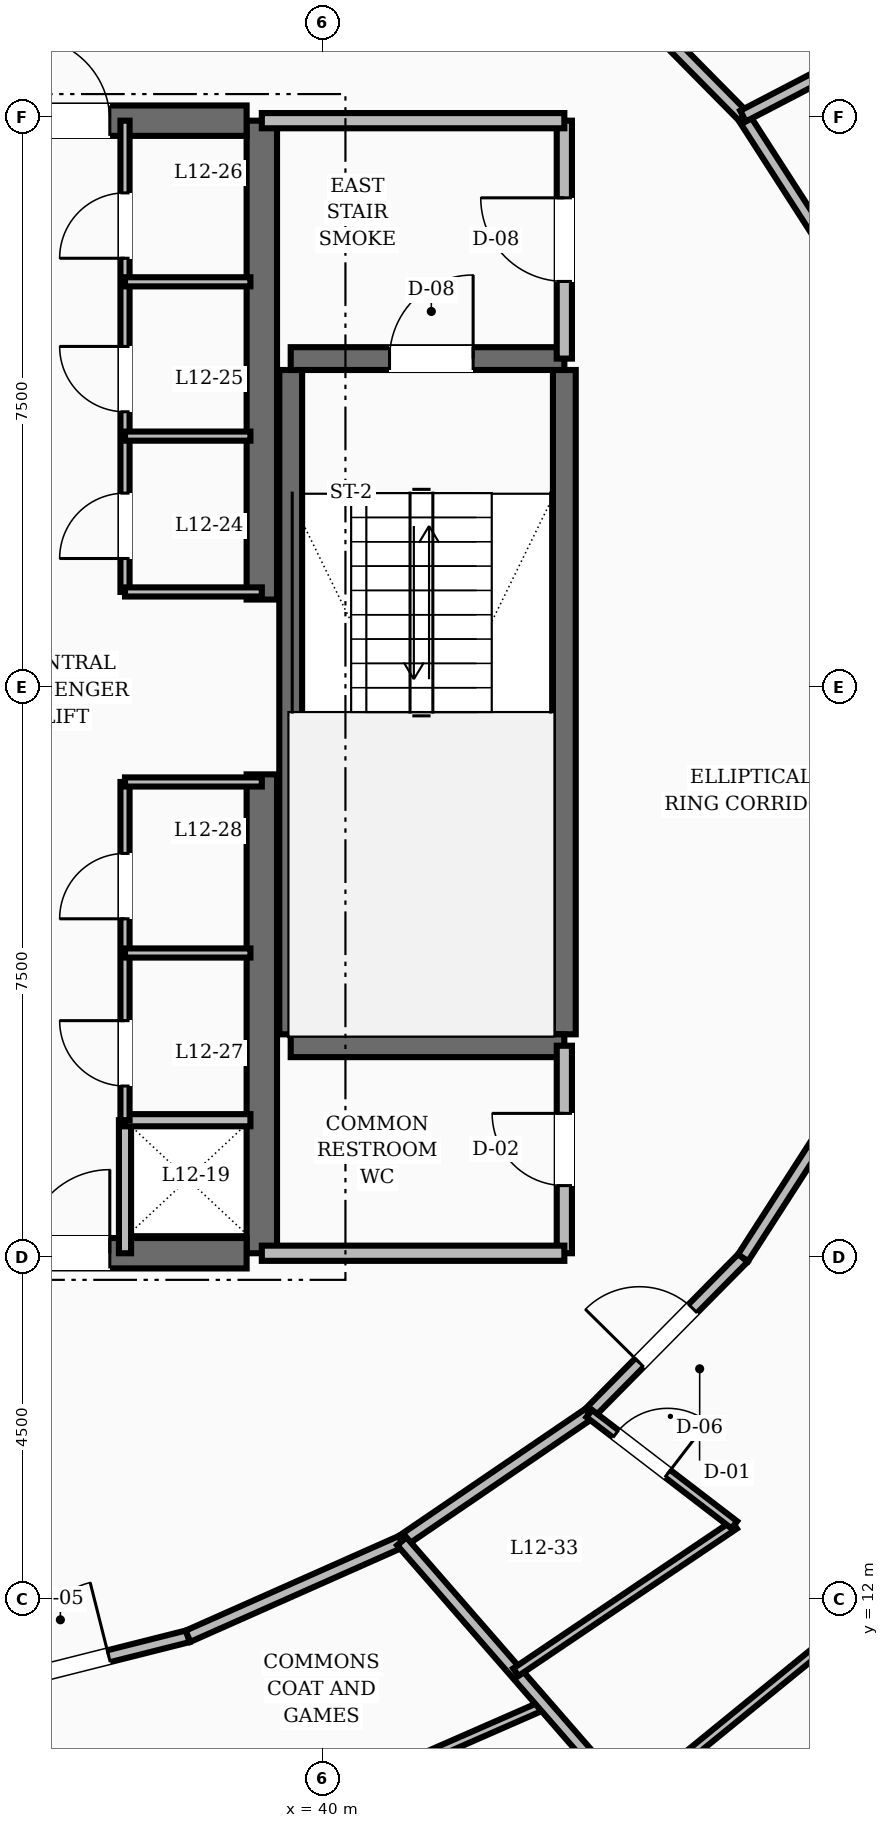
"""IFC4 building model, lengths in metres.
Left out: names, types, materials, properties, quantities, classifications, styles, units other than length and angle.
Written with IfcOpenShell. Run it as: python <this file> out.ifc"""

import sys

from ifc_helpers import new_model, si_unit, direction, frame, frame_2d, origin, place, context, subcontext, project, spatial, rectangle, extrude, element, fill, save


model = new_model("IFC4")
c1 = context("Model", 3, precision=1e-05, world=origin(), true_north=direction((0.0, 1.0)))
c2 = subcontext(c1, "Body", "Model", "MODEL_VIEW")
j1 = project(units=[si_unit("LENGTHUNIT", "METRE"), si_unit("PLANEANGLEUNIT", "RADIAN")], contexts=[c1])
p1 = place(None, origin())
s1 = spatial("IfcSite", under=j1, at=p1, CompositionType="ELEMENT")
p2 = place(p1, origin())
s2 = spatial("IfcBuilding", under=s1, at=p2, CompositionType="ELEMENT")
p3 = place(p2, frame((0.0, 0.0, 52.0)))
s3 = spatial("IfcBuildingStorey", under=s2, at=p3, CompositionType="ELEMENT", Elevation=52.0)
for number, where, z_axis, x_axis in (
    (1, (39.2, 16.55, 0.0), (0.0, 0.0, 1.0), (0.0, 1.0, 0.0)),
    (2, (39.2, 25.15, 0.0), (0.0, 0.0, 1.0), (0.0, 1.0, 0.0)),
):
    element("IfcWall", number, at=place(p3, frame(where, z_axis=z_axis, x_axis=x_axis)), inside=s3, PredefinedType="SHEAR", context=c2, shape_type="SweptSolid", body=[
        extrude(rectangle(XDim=6.3, YDim=0.4, at=frame_2d((3.15, 0.0))), origin(), (0.0, 0.0, 1.0), 3.6),
    ])
p4 = place(p3, frame((35.8, 16.55, 0.0), z_axis=(0.0, 0.0, 1.0), x_axis=(1.0, 0.0, 0.0)))
e3 = element("IfcWall", 3, at=p4, inside=s3, PredefinedType="SHEAR", context=c2, shape_type="SweptSolid", body=[
    extrude(rectangle(XDim=3.2, YDim=0.4, at=frame_2d((1.6, 0.0))), origin(), (0.0, 0.0, 1.0), 3.6),
])
p5 = place(p4, frame((0.3, 0.0, 0.0)))
e4 = element("IfcOpeningElement", 4, at=p5, cuts=e3, PredefinedType="OPENING", context=c2, shape_type="SweptSolid", body=[
    extrude(rectangle(XDim=1.1, YDim=2.1, at=frame_2d((0.55, 1.05))), frame((0.0, 0.21, 0.0), z_axis=(0.0, -1.0, 0.0), x_axis=(1.0, 0.0, 0.0)), (0.0, 0.0, 1.0), 0.42),
])
p6 = place(p3, frame((35.8, 31.45, 0.0), z_axis=(0.0, 0.0, 1.0), x_axis=(1.0, 0.0, 0.0)))
e5 = element("IfcWall", 5, at=p6, inside=s3, PredefinedType="SHEAR", context=c2, shape_type="SweptSolid", body=[
    extrude(rectangle(XDim=3.2, YDim=0.4, at=frame_2d((1.6, 0.0))), origin(), (0.0, 0.0, 1.0), 3.6),
])
p7 = place(p6, frame((0.3, 0.0, 0.0)))
e6 = element("IfcOpeningElement", 6, at=p7, cuts=e5, PredefinedType="OPENING", context=c2, shape_type="SweptSolid", body=[
    extrude(rectangle(XDim=1.1, YDim=2.1, at=frame_2d((0.55, 1.05))), frame((0.0, 0.21, 0.0), z_axis=(0.0, -1.0, 0.0), x_axis=(1.0, 0.0, 0.0)), (0.0, 0.0, 1.0), 0.42),
])
for number, where, z_axis, x_axis in (
    (7, (43.18, 19.43, 0.0), (0.0, 0.0, 1.0), (0.0, 1.0, 0.0)),
    (8, (39.58, 19.43, 0.0), (0.0, 0.0, 1.0), (0.0, 1.0, 0.0)),
):
    element("IfcWall", number, at=place(p3, frame(where, z_axis=z_axis, x_axis=x_axis)), inside=s3, PredefinedType="SHEAR", context=c2, shape_type="SweptSolid", body=[
        extrude(rectangle(XDim=8.74, YDim=0.3, at=frame_2d((4.37, 0.0))), origin(), (0.0, 0.0, 1.0), 3.6),
    ])
p8 = place(p3, frame((39.58, 19.28, 0.0), z_axis=(0.0, 0.0, 1.0), x_axis=(1.0, 0.0, 0.0)))
e9 = element("IfcWall", 9, at=p8, inside=s3, PredefinedType="SHEAR", context=c2, shape_type="SweptSolid", body=[
    extrude(rectangle(XDim=3.6, YDim=0.3, at=frame_2d((1.8, 0.0))), origin(), (0.0, 0.0, 1.0), 3.6),
])
p9 = place(p3, frame((39.58, 28.32, 0.0), z_axis=(0.0, 0.0, 1.0), x_axis=(1.0, 0.0, 0.0)))
e10 = element("IfcWall", 10, at=p9, inside=s3, PredefinedType="SHEAR", context=c2, shape_type="SweptSolid", body=[
    extrude(rectangle(XDim=3.6, YDim=0.3, at=frame_2d((1.8, 0.0))), origin(), (0.0, 0.0, 1.0), 3.6),
])
p10 = place(p9, frame((1.3, 0.0, 0.0)))
e11 = element("IfcOpeningElement", 11, at=p10, cuts=e10, PredefinedType="OPENING", context=c2, shape_type="SweptSolid", body=[
    extrude(rectangle(XDim=1.1, YDim=2.1, at=frame_2d((0.55, 1.05))), frame((0.0, 0.16, 0.0), z_axis=(0.0, -1.0, 0.0), x_axis=(1.0, 0.0, 0.0)), (0.0, 0.0, 1.0), 0.32),
])
p11 = place(p3, frame((43.18, 28.32, 0.0), z_axis=(0.0, 0.0, 1.0), x_axis=(0.0, 1.0, 0.0)))
e12 = element("IfcWall", 12, at=p11, inside=s3, PredefinedType="SOLIDWALL", context=c2, shape_type="SweptSolid", body=[
    extrude(rectangle(XDim=3.13, YDim=0.2, at=frame_2d((1.565, 0.0))), origin(), (0.0, 0.0, 1.0), 2.61),
])
p12 = place(p11, frame((1.015, 0.0, 0.0)))
e13 = element("IfcOpeningElement", 13, at=p12, cuts=e12, PredefinedType="OPENING", context=c2, shape_type="SweptSolid", body=[
    extrude(rectangle(XDim=1.1, YDim=2.1, at=frame_2d((0.55, 1.05))), frame((0.0, 0.11, 0.0), z_axis=(0.0, -1.0, 0.0), x_axis=(1.0, 0.0, 0.0)), (0.0, 0.0, 1.0), 0.22),
])
p13 = place(p3, frame((39.2, 31.45, 0.0), z_axis=(0.0, 0.0, 1.0), x_axis=(1.0, 0.0, 0.0)))
e14 = element("IfcWall", 14, at=p13, inside=s3, PredefinedType="SOLIDWALL", context=c2, shape_type="SweptSolid", body=[
    extrude(rectangle(XDim=3.98, YDim=0.2, at=frame_2d((1.99, 0.0))), origin(), (0.0, 0.0, 1.0), 2.61),
])
p14 = place(p3, frame((43.18, 16.55, 0.0), z_axis=(0.0, 0.0, 1.0), x_axis=(0.0, 1.0, 0.0)))
e15 = element("IfcWall", 15, at=p14, inside=s3, PredefinedType="SOLIDWALL", context=c2, shape_type="SweptSolid", body=[
    extrude(rectangle(XDim=2.73, YDim=0.2, at=frame_2d((1.365, 0.0))), origin(), (0.0, 0.0, 1.0), 2.61),
])
p15 = place(p14, frame((0.89, 0.0, 0.0)))
e16 = element("IfcOpeningElement", 16, at=p15, cuts=e15, PredefinedType="OPENING", context=c2, shape_type="SweptSolid", body=[
    extrude(rectangle(XDim=0.95, YDim=2.1, at=frame_2d((0.475, 1.05))), frame((0.0, 0.11, 0.0), z_axis=(0.0, -1.0, 0.0), x_axis=(1.0, 0.0, 0.0)), (0.0, 0.0, 1.0), 0.22),
])
p16 = place(p3, frame((39.2, 16.55, 0.0), z_axis=(0.0, 0.0, 1.0), x_axis=(1.0, 0.0, 0.0)))
e17 = element("IfcWall", 17, at=p16, inside=s3, PredefinedType="SOLIDWALL", context=c2, shape_type="SweptSolid", body=[
    extrude(rectangle(XDim=3.98, YDim=0.2, at=frame_2d((1.99, 0.0))), origin(), (0.0, 0.0, 1.0), 2.61),
])
p17 = place(p3, frame((37.4, 16.55, 0.0), z_axis=(0.0, 0.0, 1.0), x_axis=(0.0, 1.0, 0.0)))
e18 = element("IfcWall", 18, at=p17, inside=s3, PredefinedType="SOLIDWALL", context=c2, shape_type="SweptSolid", body=[
    extrude(rectangle(XDim=1.75, YDim=0.16, at=frame_2d((0.875, 0.0))), origin(), (0.0, 0.0, 1.0), 2.61),
])
p18 = place(p3, frame((37.4, 18.3, 0.0), z_axis=(0.0, 0.0, 1.0), x_axis=(1.0, 0.0, 0.0)))
e19 = element("IfcWall", 19, at=p18, inside=s3, PredefinedType="SOLIDWALL", context=c2, shape_type="SweptSolid", body=[
    extrude(rectangle(XDim=1.65, YDim=0.16, at=frame_2d((0.825, 0.0))), origin(), (0.0, 0.0, 1.0), 2.61),
])
p19 = place(p3, frame((37.4, 25.25, 0.0), z_axis=(0.0, 0.0, 1.0), x_axis=(0.0, 1.0, 0.0)))
e20 = element("IfcWall", 20, at=p19, inside=s3, PredefinedType="PARTITIONING", context=c2, shape_type="SweptSolid", body=[
    extrude(rectangle(XDim=6.2, YDim=0.12, at=frame_2d((3.1, 0.0))), origin(), (0.0, 0.0, 1.0), 2.61),
])
p20 = place(p19, frame((0.44, 0.0, 0.0)))
e21 = element("IfcOpeningElement", 21, at=p20, cuts=e20, PredefinedType="OPENING", context=c2, shape_type="SweptSolid", body=[
    extrude(rectangle(XDim=0.86, YDim=2.1, at=frame_2d((0.43, 1.05))), frame((0.0, 0.07, 0.0), z_axis=(0.0, -1.0, 0.0), x_axis=(1.0, 0.0, 0.0)), (0.0, 0.0, 1.0), 0.14),
])
p21 = place(p19, frame((2.37, 0.0, 0.0)))
e22 = element("IfcOpeningElement", 22, at=p21, cuts=e20, PredefinedType="OPENING", context=c2, shape_type="SweptSolid", body=[
    extrude(rectangle(XDim=0.86, YDim=2.1, at=frame_2d((0.43, 1.05))), frame((0.0, 0.07, 0.0), z_axis=(0.0, -1.0, 0.0), x_axis=(1.0, 0.0, 0.0)), (0.0, 0.0, 1.0), 0.14),
])
p22 = place(p19, frame((4.39, 0.0, 0.0)))
e23 = element("IfcOpeningElement", 23, at=p22, cuts=e20, PredefinedType="OPENING", context=c2, shape_type="SweptSolid", body=[
    extrude(rectangle(XDim=0.86, YDim=2.1, at=frame_2d((0.43, 1.05))), frame((0.0, 0.07, 0.0), z_axis=(0.0, -1.0, 0.0), x_axis=(1.0, 0.0, 0.0)), (0.0, 0.0, 1.0), 0.14),
])
p23 = place(p3, frame((37.4, 25.25, 0.0), z_axis=(0.0, 0.0, 1.0), x_axis=(1.0, 0.0, 0.0)))
e24 = element("IfcWall", 24, at=p23, inside=s3, PredefinedType="PARTITIONING", context=c2, shape_type="SweptSolid", body=[
    extrude(rectangle(XDim=1.8, YDim=0.12, at=frame_2d((0.9, 0.0))), origin(), (0.0, 0.0, 1.0), 2.61),
])
p24 = place(p3, frame((37.4, 18.3, 0.0), z_axis=(0.0, 0.0, 1.0), x_axis=(0.0, 1.0, 0.0)))
e25 = element("IfcWall", 25, at=p24, inside=s3, PredefinedType="PARTITIONING", context=c2, shape_type="SweptSolid", body=[
    extrude(rectangle(XDim=4.45, YDim=0.12, at=frame_2d((2.225, 0.0))), origin(), (0.0, 0.0, 1.0), 2.61),
])
p25 = place(p24, frame((0.45, 0.0, 0.0)))
e26 = element("IfcOpeningElement", 26, at=p25, cuts=e25, PredefinedType="OPENING", context=c2, shape_type="SweptSolid", body=[
    extrude(rectangle(XDim=0.86, YDim=2.1, at=frame_2d((0.43, 1.05))), frame((0.0, 0.07, 0.0), z_axis=(0.0, -1.0, 0.0), x_axis=(1.0, 0.0, 0.0)), (0.0, 0.0, 1.0), 0.14),
])
p26 = place(p24, frame((2.65, 0.0, 0.0)))
e27 = element("IfcOpeningElement", 27, at=p26, cuts=e25, PredefinedType="OPENING", context=c2, shape_type="SweptSolid", body=[
    extrude(rectangle(XDim=0.86, YDim=2.1, at=frame_2d((0.43, 1.05))), frame((0.0, 0.07, 0.0), z_axis=(0.0, -1.0, 0.0), x_axis=(1.0, 0.0, 0.0)), (0.0, 0.0, 1.0), 0.14),
])
p27 = place(p3, frame((37.4, 22.75, 0.0), z_axis=(0.0, 0.0, 1.0), x_axis=(1.0, 0.0, 0.0)))
e28 = element("IfcWall", 28, at=p27, inside=s3, PredefinedType="PARTITIONING", context=c2, shape_type="SweptSolid", body=[
    extrude(rectangle(XDim=1.8, YDim=0.12, at=frame_2d((0.9, 0.0))), origin(), (0.0, 0.0, 1.0), 2.61),
])
for number, where, z_axis, x_axis in (
    (29, (37.4, 27.3, 0.0), (0.0, 0.0, 1.0), (1.0, 0.0, 0.0)),
    (30, (37.4, 29.33, 0.0), (0.0, 0.0, 1.0), (1.0, 0.0, 0.0)),
    (31, (37.4, 20.5, 0.0), (0.0, 0.0, 1.0), (1.0, 0.0, 0.0)),
):
    element("IfcWall", number, at=place(p3, frame(where, z_axis=z_axis, x_axis=x_axis)), inside=s3, PredefinedType="PARTITIONING", context=c2, shape_type="SweptSolid", body=[
        extrude(rectangle(XDim=1.65, YDim=0.12, at=frame_2d((0.825, 0.0))), origin(), (0.0, 0.0, 1.0), 2.61),
    ])
p28 = place(p3, frame((47.035, 29.173, 0.0), z_axis=(0.0, 0.0, 1.0), x_axis=(-0.541126045017, 0.840941498206, 0.0)))
e32 = element("IfcWall", 32, at=p28, inside=s3, PredefinedType="SOLIDWALL", context=c2, shape_type="SweptSolid", body=[
    extrude(rectangle(XDim=2.779, YDim=0.16, at=frame_2d((1.39, 0.0))), origin(), (0.0, 0.0, 1.0), 2.61),
])
p29 = place(p3, frame((45.531, 31.51, 0.0), z_axis=(0.0, 0.0, 1.0), x_axis=(-0.702811997, 0.711375636969, 0.0)))
e33 = element("IfcWall", 33, at=p29, inside=s3, PredefinedType="SOLIDWALL", context=c2, shape_type="SweptSolid", body=[
    extrude(rectangle(XDim=2.879, YDim=0.16, at=frame_2d((1.44, 0.0))), origin(), (0.0, 0.0, 1.0), 2.61),
])
p30 = place(p3, frame((35.175, 10.742, 0.0), z_axis=(0.0, 0.0, 1.0), x_axis=(0.969689238064, 0.244341526521, 0.0)))
e34 = element("IfcWall", 34, at=p30, inside=s3, PredefinedType="SOLIDWALL", context=c2, shape_type="SweptSolid", body=[
    extrude(rectangle(XDim=3.148, YDim=0.16, at=frame_2d((1.574, 0.0))), origin(), (0.0, 0.0, 1.0), 2.61),
])
p31 = place(p30, frame((1.074, 0.0, 0.0)))
e35 = element("IfcOpeningElement", 35, at=p31, cuts=e34, PredefinedType="OPENING", context=c2, shape_type="SweptSolid", body=[
    extrude(rectangle(XDim=1.0, YDim=2.1, at=frame_2d((0.5, 1.05))), frame((0.0, 0.09, 0.0), z_axis=(0.0, -1.0, 0.0), x_axis=(1.0, 0.0, 0.0)), (0.0, 0.0, 1.0), 0.18),
])
p32 = place(p3, frame((38.228, 11.511, 0.0), z_axis=(0.0, 0.0, 1.0), x_axis=(0.913952123493, 0.405822024984, 0.0)))
e36 = element("IfcWall", 36, at=p32, inside=s3, PredefinedType="SOLIDWALL", context=c2, shape_type="SweptSolid", body=[
    extrude(rectangle(XDim=3.078, YDim=0.16, at=frame_2d((1.539, 0.0))), origin(), (0.0, 0.0, 1.0), 2.61),
])
p33 = place(p3, frame((41.041, 12.76, 0.0), z_axis=(0.0, 0.0, 1.0), x_axis=(0.826293096206, 0.56324037423, 0.0)))
e37 = element("IfcWall", 37, at=p33, inside=s3, PredefinedType="SOLIDWALL", context=c2, shape_type="SweptSolid", body=[
    extrude(rectangle(XDim=2.985, YDim=0.16, at=frame_2d((1.492, 0.0))), origin(), (0.0, 0.0, 1.0), 2.61),
])
p34 = place(p3, frame((43.508, 14.441, 0.0), z_axis=(0.0, 0.0, 1.0), x_axis=(0.702811997, 0.711375636969, 0.0)))
e38 = element("IfcWall", 38, at=p34, inside=s3, PredefinedType="SOLIDWALL", context=c2, shape_type="SweptSolid", body=[
    extrude(rectangle(XDim=2.879, YDim=0.16, at=frame_2d((1.44, 0.0))), origin(), (0.0, 0.0, 1.0), 2.61),
])
p35 = place(p34, frame((0.94, 0.0, 0.0)))
e39 = element("IfcOpeningElement", 39, at=p35, cuts=e38, PredefinedType="OPENING", context=c2, shape_type="SweptSolid", body=[
    extrude(rectangle(XDim=1.0, YDim=2.1, at=frame_2d((0.5, 1.05))), frame((0.0, 0.09, 0.0), z_axis=(0.0, -1.0, 0.0), x_axis=(1.0, 0.0, 0.0)), (0.0, 0.0, 1.0), 0.18),
])
p36 = place(p3, frame((45.531, 16.49, 0.0), z_axis=(0.0, 0.0, 1.0), x_axis=(0.541126045017, 0.840941498206, 0.0)))
e40 = element("IfcWall", 40, at=p36, inside=s3, PredefinedType="SOLIDWALL", context=c2, shape_type="SweptSolid", body=[
    extrude(rectangle(XDim=2.779, YDim=0.16, at=frame_2d((1.39, 0.0))), origin(), (0.0, 0.0, 1.0), 2.61),
])
p37 = place(p3, frame((39.519, 9.119, 0.0), z_axis=(0.0, 0.0, 1.0), x_axis=(0.91594871557, 0.401295340672, 0.0)))
e41 = element("IfcWall", 41, at=p37, inside=s3, PredefinedType="PARTITIONING", context=c2, shape_type="SweptSolid", body=[
    extrude(rectangle(XDim=3.709, YDim=0.12, at=frame_2d((1.854, 0.0))), origin(), (0.0, 0.0, 1.0), 2.61),
])
p38 = place(p3, frame((41.041, 12.76, 0.0), z_axis=(0.0, 0.0, 1.0), x_axis=(0.656743729698, -0.754113833252, 0.0)))
e42 = element("IfcWall", 42, at=p38, inside=s3, PredefinedType="SOLIDWALL", context=c2, shape_type="SweptSolid", body=[
    extrude(rectangle(XDim=8.106, YDim=0.16, at=frame_2d((4.053, 0.0))), origin(), (0.0, 0.0, 1.0), 2.61),
])
p39 = place(p3, frame((42.541, 11.038, 0.0), z_axis=(0.0, 0.0, 1.0), x_axis=(0.829125253788, 0.559062888709, 0.0)))
e43 = element("IfcWall", 43, at=p39, inside=s3, PredefinedType="PARTITIONING", context=c2, shape_type="SweptSolid", body=[
    extrude(rectangle(XDim=3.468, YDim=0.12, at=frame_2d((1.734, 0.0))), origin(), (0.0, 0.0, 1.0), 2.61),
])
p40 = place(p3, frame((43.508, 14.441, 0.0), z_axis=(0.0, 0.0, 1.0), x_axis=(0.793351497124, -0.608763831063, 0.0)))
e44 = element("IfcWall", 44, at=p40, inside=s3, PredefinedType="PARTITIONING", context=c2, shape_type="SweptSolid", body=[
    extrude(rectangle(XDim=2.406, YDim=0.12, at=frame_2d((1.203, 0.0))), origin(), (0.0, 0.0, 1.0), 2.61),
])
p41 = place(p40, frame((0.44, 0.0, 0.0)))
e45 = element("IfcOpeningElement", 45, at=p41, cuts=e44, PredefinedType="OPENING", context=c2, shape_type="SweptSolid", body=[
    extrude(rectangle(XDim=0.86, YDim=2.1, at=frame_2d((0.43, 1.05))), frame((0.0, 0.07, 0.0), z_axis=(0.0, -1.0, 0.0), x_axis=(1.0, 0.0, 0.0)), (0.0, 0.0, 1.0), 0.14),
])
p42 = place(p3, frame((44.041, 9.316, 0.0), z_axis=(0.0, 0.0, 1.0), x_axis=(0.775210874422, 0.631702540899, 0.0)))
e46 = element("IfcWall", 46, at=p42, inside=s3, PredefinedType="PARTITIONING", context=c2, shape_type="SweptSolid", body=[
    extrude(rectangle(XDim=7.713, YDim=0.12, at=frame_2d((3.857, 0.0))), origin(), (0.0, 0.0, 1.0), 2.61),
])
p43 = place(p42, frame((4.676, 0.0, 0.0)))
e47 = element("IfcOpeningElement", 47, at=p43, cuts=e46, PredefinedType="OPENING", context=c2, shape_type="SweptSolid", body=[
    extrude(rectangle(XDim=0.95, YDim=2.1, at=frame_2d((0.475, 1.05))), frame((0.0, 0.07, 0.0), z_axis=(0.0, -1.0, 0.0), x_axis=(1.0, 0.0, 0.0)), (0.0, 0.0, 1.0), 0.14),
])
p44 = place(p3, frame((45.531, 31.51, 0.0), z_axis=(0.0, 0.0, 1.0), x_axis=(0.886782865133, 0.462186272088, 0.0)))
e48 = element("IfcWall", 48, at=p44, inside=s3, PredefinedType="SOLIDWALL", context=c2, shape_type="SweptSolid", body=[
    extrude(rectangle(XDim=9.515, YDim=0.16, at=frame_2d((4.757, 0.0))), origin(), (0.0, 0.0, 1.0), 2.61),
])
p45 = place(p10, origin())
e49 = element("IfcDoor", 49, at=p45, inside=s3, OperationType="SINGLE_SWING_RIGHT", PredefinedType="DOOR", context=c2, shape_type="SweptSolid", body=[
    extrude(rectangle(XDim=1.1, YDim=2.1, at=frame_2d((0.55, 1.05))), frame((0.0, 0.025, 0.0), z_axis=(0.0, -1.0, 0.0), x_axis=(1.0, 0.0, 0.0)), (0.0, 0.0, 1.0), 0.05),
])
fill(e11, e49)
p46 = place(p12, origin())
e50 = element("IfcDoor", 50, at=p46, inside=s3, OperationType="SINGLE_SWING_RIGHT", PredefinedType="DOOR", context=c2, shape_type="SweptSolid", body=[
    extrude(rectangle(XDim=1.1, YDim=2.1, at=frame_2d((0.55, 1.05))), frame((0.0, 0.025, 0.0), z_axis=(0.0, -1.0, 0.0), x_axis=(1.0, 0.0, 0.0)), (0.0, 0.0, 1.0), 0.05),
])
fill(e13, e50)
p47 = place(p15, origin())
e51 = element("IfcDoor", 51, at=p47, inside=s3, OperationType="SINGLE_SWING_RIGHT", PredefinedType="DOOR", context=c2, shape_type="SweptSolid", body=[
    extrude(rectangle(XDim=0.95, YDim=2.1, at=frame_2d((0.475, 1.05))), frame((0.0, 0.025, 0.0), z_axis=(0.0, -1.0, 0.0), x_axis=(1.0, 0.0, 0.0)), (0.0, 0.0, 1.0), 0.05),
])
fill(e16, e51)
p48 = place(p7, origin())
e52 = element("IfcDoor", 52, at=p48, inside=s3, OperationType="SINGLE_SWING_LEFT", PredefinedType="DOOR", context=c2, shape_type="SweptSolid", body=[
    extrude(rectangle(XDim=1.1, YDim=2.1, at=frame_2d((0.55, 1.05))), frame((0.0, 0.025, 0.0), z_axis=(0.0, -1.0, 0.0), x_axis=(1.0, 0.0, 0.0)), (0.0, 0.0, 1.0), 0.05),
])
fill(e6, e52)
p49 = place(p5, origin())
e53 = element("IfcDoor", 53, at=p49, inside=s3, OperationType="SINGLE_SWING_RIGHT", PredefinedType="DOOR", context=c2, shape_type="SweptSolid", body=[
    extrude(rectangle(XDim=1.1, YDim=2.1, at=frame_2d((0.55, 1.05))), frame((0.0, 0.025, 0.0), z_axis=(0.0, -1.0, 0.0), x_axis=(1.0, 0.0, 0.0)), (0.0, 0.0, 1.0), 0.05),
])
fill(e4, e53)
p50 = place(p20, origin())
e54 = element("IfcDoor", 54, at=p50, inside=s3, OperationType="SINGLE_SWING_LEFT", PredefinedType="DOOR", context=c2, shape_type="SweptSolid", body=[
    extrude(rectangle(XDim=0.86, YDim=2.1, at=frame_2d((0.43, 1.05))), frame((0.0, 0.025, 0.0), z_axis=(0.0, -1.0, 0.0), x_axis=(1.0, 0.0, 0.0)), (0.0, 0.0, 1.0), 0.05),
])
fill(e21, e54)
p51 = place(p21, origin())
e55 = element("IfcDoor", 55, at=p51, inside=s3, OperationType="SINGLE_SWING_RIGHT", PredefinedType="DOOR", context=c2, shape_type="SweptSolid", body=[
    extrude(rectangle(XDim=0.86, YDim=2.1, at=frame_2d((0.43, 1.05))), frame((0.0, 0.025, 0.0), z_axis=(0.0, -1.0, 0.0), x_axis=(1.0, 0.0, 0.0)), (0.0, 0.0, 1.0), 0.05),
])
fill(e22, e55)
p52 = place(p22, origin())
e56 = element("IfcDoor", 56, at=p52, inside=s3, OperationType="SINGLE_SWING_LEFT", PredefinedType="DOOR", context=c2, shape_type="SweptSolid", body=[
    extrude(rectangle(XDim=0.86, YDim=2.1, at=frame_2d((0.43, 1.05))), frame((0.0, 0.025, 0.0), z_axis=(0.0, -1.0, 0.0), x_axis=(1.0, 0.0, 0.0)), (0.0, 0.0, 1.0), 0.05),
])
fill(e23, e56)
p53 = place(p25, origin())
e57 = element("IfcDoor", 57, at=p53, inside=s3, OperationType="SINGLE_SWING_RIGHT", PredefinedType="DOOR", context=c2, shape_type="SweptSolid", body=[
    extrude(rectangle(XDim=0.86, YDim=2.1, at=frame_2d((0.43, 1.05))), frame((0.0, 0.025, 0.0), z_axis=(0.0, -1.0, 0.0), x_axis=(1.0, 0.0, 0.0)), (0.0, 0.0, 1.0), 0.05),
])
fill(e26, e57)
p54 = place(p26, origin())
e58 = element("IfcDoor", 58, at=p54, inside=s3, OperationType="SINGLE_SWING_LEFT", PredefinedType="DOOR", context=c2, shape_type="SweptSolid", body=[
    extrude(rectangle(XDim=0.86, YDim=2.1, at=frame_2d((0.43, 1.05))), frame((0.0, 0.025, 0.0), z_axis=(0.0, -1.0, 0.0), x_axis=(1.0, 0.0, 0.0)), (0.0, 0.0, 1.0), 0.05),
])
fill(e27, e58)
p55 = place(p31, origin())
e59 = element("IfcDoor", 59, at=p55, inside=s3, OperationType="SINGLE_SWING_RIGHT", PredefinedType="DOOR", context=c2, shape_type="SweptSolid", body=[
    extrude(rectangle(XDim=1.0, YDim=2.1, at=frame_2d((0.5, 1.05))), frame((0.0, 0.025, 0.0), z_axis=(0.0, -1.0, 0.0), x_axis=(1.0, 0.0, 0.0)), (0.0, 0.0, 1.0), 0.05),
])
fill(e35, e59)
p56 = place(p41, origin())
e60 = element("IfcDoor", 60, at=p56, inside=s3, OperationType="SINGLE_SWING_RIGHT", PredefinedType="DOOR", context=c2, shape_type="SweptSolid", body=[
    extrude(rectangle(XDim=0.86, YDim=2.1, at=frame_2d((0.43, 1.05))), frame((0.0, 0.025, 0.0), z_axis=(0.0, -1.0, 0.0), x_axis=(1.0, 0.0, 0.0)), (0.0, 0.0, 1.0), 0.05),
])
fill(e45, e60)
p57 = place(p35, origin())
e61 = element("IfcDoor", 61, at=p57, inside=s3, OperationType="SINGLE_SWING_LEFT", PredefinedType="DOOR", context=c2, shape_type="SweptSolid", body=[
    extrude(rectangle(XDim=1.0, YDim=2.1, at=frame_2d((0.5, 1.05))), frame((0.0, 0.025, 0.0), z_axis=(0.0, -1.0, 0.0), x_axis=(1.0, 0.0, 0.0)), (0.0, 0.0, 1.0), 0.05),
])
fill(e39, e61)
save(model, sys.argv[1])
